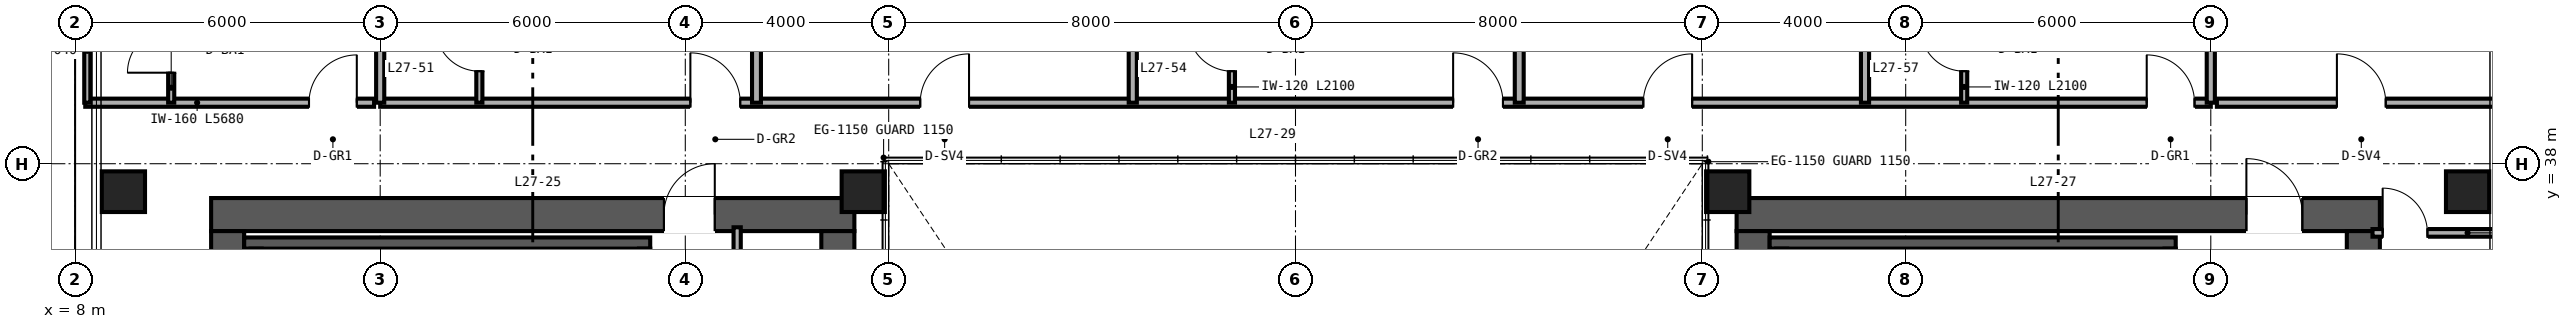
"""IFC4 building model, lengths in metres.
Left out: names, types, materials, properties, quantities, classifications, styles, units other than length and angle.
Written with IfcOpenShell. Run it as: python <this file> out.ifc"""

import sys

from ifc_helpers import new_model, si_unit, direction, frame, frame_2d, origin, origin_2d, place, context, subcontext, project, spatial, rectangle, hollow_rectangle, extrude, source, transform, mapped, element, fill, save


model = new_model("IFC4")
c1 = context("Model", 3, precision=1e-05, world=origin(), true_north=direction((0.0, 1.0)))
c2 = subcontext(c1, "Body", "Model", "MODEL_VIEW")
j1 = project(units=[si_unit("LENGTHUNIT", "METRE"), si_unit("PLANEANGLEUNIT", "RADIAN")], contexts=[c1])
p1 = place(None, origin())
s1 = spatial("IfcSite", under=j1, at=p1, CompositionType="ELEMENT")
p2 = place(p1, origin())
s2 = spatial("IfcBuilding", under=s1, at=p2, CompositionType="ELEMENT")
p3 = place(p2, frame((0.0, 0.0, 111.6)))
s3 = spatial("IfcBuildingStorey", under=s2, at=p3, CompositionType="ELEMENT", Elevation=111.6)
p4 = place(p3, frame((10.675, 37.0, 0.0), z_axis=(0.0, 0.0, 1.0), x_axis=(1.0, 0.0, 0.0)))
e1 = element("IfcWall", 1, at=p4, inside=s3, PredefinedType="SHEAR", context=c2, shape_type="SweptSolid", body=[
    extrude(rectangle(XDim=12.65, YDim=0.65, at=frame_2d((6.325, 0.0))), origin(), (0.0, 0.0, 1.0), 3.36),
])
p5 = place(p4, frame((8.905, 0.0, 0.0)))
e2 = element("IfcOpeningElement", 2, at=p5, cuts=e1, PredefinedType="OPENING", context=c2, shape_type="SweptSolid", body=[
    extrude(rectangle(XDim=1.0, YDim=2.15, at=frame_2d((0.5, 1.075))), frame((0.0, 0.335, 0.0), z_axis=(0.0, -1.0, 0.0), x_axis=(1.0, 0.0, 0.0)), (0.0, 0.0, 1.0), 0.67),
])
for number, where, z_axis, x_axis in (
    (3, (11.0, 15.325, 0.0), (0.0, 0.0, 1.0), (0.0, 1.0, 0.0)),
    (4, (23.0, 15.325, 0.0), (0.0, 0.0, 1.0), (0.0, 1.0, 0.0)),
):
    element("IfcWall", number, at=place(p3, frame(where, z_axis=z_axis, x_axis=x_axis)), inside=s3, PredefinedType="SHEAR", context=c2, shape_type="SweptSolid", body=[
        extrude(rectangle(XDim=21.35, YDim=0.65, at=frame_2d((10.675, 0.0))), origin(), (0.0, 0.0, 1.0), 3.36),
    ])
p6 = place(p3, frame((40.675, 37.0, 0.0), z_axis=(0.0, 0.0, 1.0), x_axis=(1.0, 0.0, 0.0)))
e5 = element("IfcWall", 5, at=p6, inside=s3, PredefinedType="SHEAR", context=c2, shape_type="SweptSolid", body=[
    extrude(rectangle(XDim=12.65, YDim=0.65, at=frame_2d((6.325, 0.0))), origin(), (0.0, 0.0, 1.0), 3.36),
])
p7 = place(p6, frame((10.025, 0.0, 0.0)))
e6 = element("IfcOpeningElement", 6, at=p7, cuts=e5, PredefinedType="OPENING", context=c2, shape_type="SweptSolid", body=[
    extrude(rectangle(XDim=1.1, YDim=2.15, at=frame_2d((0.55, 1.075))), frame((0.0, 0.335, 0.0), z_axis=(0.0, -1.0, 0.0), x_axis=(1.0, 0.0, 0.0)), (0.0, 0.0, 1.0), 0.67),
])
for number, where, z_axis, x_axis in (
    (7, (41.0, 15.325, 0.0), (0.0, 0.0, 1.0), (0.0, 1.0, 0.0)),
    (8, (53.0, 15.325, 0.0), (0.0, 0.0, 1.0), (0.0, 1.0, 0.0)),
):
    element("IfcWall", number, at=place(p3, frame(where, z_axis=z_axis, x_axis=x_axis)), inside=s3, PredefinedType="SHEAR", context=c2, shape_type="SweptSolid", body=[
        extrude(rectangle(XDim=21.35, YDim=0.65, at=frame_2d((10.675, 0.0))), origin(), (0.0, 0.0, 1.0), 3.36),
    ])
p8 = place(p3, frame((11.325, 36.44, 0.0), z_axis=(0.0, 0.0, 1.0), x_axis=(1.0, 0.0, 0.0)))
e9 = element("IfcWall", 9, at=p8, inside=s3, PredefinedType="SHEAR", context=c2, shape_type="SweptSolid", body=[
    extrude(rectangle(XDim=7.985, YDim=0.22, at=frame_2d((3.993, 0.0))), origin(), (0.0, 0.0, 1.0), 3.4),
])
for number, where, z_axis, x_axis in (
    (10, (11.56, 33.05, 0.0), (0.0, 0.0, 1.0), (0.0, 1.0, 0.0)),
    (11, (19.2, 33.05, 0.0), (0.0, 0.0, 1.0), (0.0, 1.0, 0.0)),
):
    element("IfcWall", number, at=place(p3, frame(where, z_axis=z_axis, x_axis=x_axis)), inside=s3, PredefinedType="SHEAR", context=c2, shape_type="SweptSolid", body=[
        extrude(rectangle(XDim=3.28, YDim=0.22, at=frame_2d((1.64, 0.0))), origin(), (0.0, 0.0, 1.0), 3.4),
    ])
p9 = place(p3, frame((41.325, 36.44, 0.0), z_axis=(0.0, 0.0, 1.0), x_axis=(1.0, 0.0, 0.0)))
e12 = element("IfcWall", 12, at=p9, inside=s3, PredefinedType="SHEAR", context=c2, shape_type="SweptSolid", body=[
    extrude(rectangle(XDim=7.985, YDim=0.22, at=frame_2d((3.993, 0.0))), origin(), (0.0, 0.0, 1.0), 3.4),
])
for number, where, z_axis, x_axis in (
    (13, (41.56, 33.05, 0.0), (0.0, 0.0, 1.0), (0.0, 1.0, 0.0)),
    (14, (49.2, 33.05, 0.0), (0.0, 0.0, 1.0), (0.0, 1.0, 0.0)),
):
    element("IfcWall", number, at=place(p3, frame(where, z_axis=z_axis, x_axis=x_axis)), inside=s3, PredefinedType="SHEAR", context=c2, shape_type="SweptSolid", body=[
        extrude(rectangle(XDim=3.28, YDim=0.22, at=frame_2d((1.64, 0.0))), origin(), (0.0, 0.0, 1.0), 3.4),
    ])
m1 = source(origin(), c2, "Body", "SweptSolid", [
    extrude(hollow_rectangle(XDim=0.85, YDim=0.8, WallThickness=0.032, at=origin_2d()), origin(), (0.0, 0.0, 1.0), 3.36),
])
for number, where, z_axis, x_axis in (
    (15, (8.95, 37.45, 0.0), (0.0, 0.0, 1.0), (1.0, 0.0, 0.0)),
    (16, (23.5, 37.45, 0.0), (0.0, 0.0, 1.0), (1.0, 0.0, 0.0)),
    (17, (40.5, 37.45, 0.0), (0.0, 0.0, 1.0), (1.0, 0.0, 0.0)),
    (18, (55.05, 37.45, 0.0), (0.0, 0.0, 1.0), (1.0, 0.0, 0.0)),
):
    element("IfcColumn", number, at=place(p3, frame(where, z_axis=z_axis, x_axis=x_axis)), inside=s3, PredefinedType="COLUMN", context=c2, shape_type="MappedRepresentation", body=[
        mapped(m1, transform((0.0, 0.0, 0.0), scale=1.0)),
    ])
p10 = place(p3, frame((21.02, 33.28, 0.0), z_axis=(0.0, 0.0, 1.0), x_axis=(0.0, 1.0, 0.0)))
e19 = element("IfcWall", 19, at=p10, inside=s3, PredefinedType="PARTITIONING", context=c2, shape_type="SweptSolid", body=[
    extrude(rectangle(XDim=3.47, YDim=0.142, at=frame_2d((1.735, 0.0))), origin(), (0.0, 0.0, 1.0), 3.36),
])
p11 = place(p10, frame((1.15, 0.0, 0.0)))
e20 = element("IfcOpeningElement", 20, at=p11, cuts=e19, PredefinedType="OPENING", context=c2, shape_type="SweptSolid", body=[
    extrude(rectangle(XDim=0.84, YDim=2.1, at=frame_2d((0.42, 1.05))), frame((0.0, 0.081, 0.0), z_axis=(0.0, -1.0, 0.0), x_axis=(1.0, 0.0, 0.0)), (0.0, 0.0, 1.0), 0.162),
])
p12 = place(p3, frame((53.18, 36.64, 0.0), z_axis=(0.0, 0.0, 1.0), x_axis=(1.0, 0.0, 0.0)))
e21 = element("IfcWall", 21, at=p12, inside=s3, PredefinedType="PARTITIONING", context=c2, shape_type="SweptSolid", body=[
    extrude(rectangle(XDim=2.66, YDim=0.15, at=frame_2d((1.33, 0.0))), origin(), (0.0, 0.0, 1.0), 2.743),
])
p13 = place(p12, frame((0.2, 0.0, 0.0)))
e22 = element("IfcOpeningElement", 22, at=p13, cuts=e21, PredefinedType="OPENING", context=c2, shape_type="SweptSolid", body=[
    extrude(rectangle(XDim=0.88, YDim=2.15, at=frame_2d((0.44, 1.075))), frame((0.0, 0.085, 0.0), z_axis=(0.0, -1.0, 0.0), x_axis=(1.0, 0.0, 0.0)), (0.0, 0.0, 1.0), 0.17),
])
p14 = place(p3, frame((8.2, 39.2, 0.0), z_axis=(0.0, 0.0, 1.0), x_axis=(1.0, 0.0, 0.0)))
e23 = element("IfcWall", 23, at=p14, inside=s3, PredefinedType="PARTITIONING", context=c2, shape_type="SweptSolid", body=[
    extrude(rectangle(XDim=5.68, YDim=0.16, at=frame_2d((2.84, 0.0))), origin(), (0.0, 0.0, 1.0), 3.36),
])
p15 = place(p14, frame((4.4, 0.0, 0.0)))
e24 = element("IfcOpeningElement", 24, at=p15, cuts=e23, PredefinedType="OPENING", context=c2, shape_type="SweptSolid", body=[
    extrude(rectangle(XDim=0.94, YDim=2.15, at=frame_2d((0.47, 1.075))), frame((0.0, 0.09, 0.0), z_axis=(0.0, -1.0, 0.0), x_axis=(1.0, 0.0, 0.0)), (0.0, 0.0, 1.0), 0.18),
])
p16 = place(p3, frame((9.89, 39.2, 0.0), z_axis=(0.0, 0.0, 1.0), x_axis=(0.0, 1.0, 0.0)))
e25 = element("IfcWall", 25, at=p16, inside=s3, PredefinedType="PARTITIONING", context=c2, shape_type="SweptSolid", body=[
    extrude(rectangle(XDim=2.04, YDim=0.12, at=frame_2d((1.02, 0.0))), origin(), (0.0, 0.0, 1.0), 3.36),
])
p17 = place(p16, frame((0.59, 0.0, 0.0)))
e26 = element("IfcOpeningElement", 26, at=p17, cuts=e25, PredefinedType="OPENING", context=c2, shape_type="SweptSolid", body=[
    extrude(rectangle(XDim=0.86, YDim=2.1, at=frame_2d((0.43, 1.05))), frame((0.0, 0.07, 0.0), z_axis=(0.0, -1.0, 0.0), x_axis=(1.0, 0.0, 0.0)), (0.0, 0.0, 1.0), 0.14),
])
p18 = place(p3, frame((8.24, 39.2, 0.0), z_axis=(0.0, 0.0, 1.0), x_axis=(0.0, 1.0, 0.0)))
e27 = element("IfcWall", 27, at=p18, inside=s3, PredefinedType="PARTITIONING", context=c2, shape_type="SweptSolid", body=[
    extrude(rectangle(XDim=2.04, YDim=0.12, at=frame_2d((1.02, 0.0))), origin(), (0.0, 0.0, 1.0), 3.36),
])
p19 = place(p3, frame((50.12, 39.2, 0.0), z_axis=(0.0, 0.0, 1.0), x_axis=(1.0, 0.0, 0.0)))
e28 = element("IfcWall", 28, at=p19, inside=s3, PredefinedType="PARTITIONING", context=c2, shape_type="SweptSolid", body=[
    extrude(rectangle(XDim=5.68, YDim=0.16, at=frame_2d((2.84, 0.0))), origin(), (0.0, 0.0, 1.0), 3.36),
])
p20 = place(p19, frame((2.36, 0.0, 0.0)))
e29 = element("IfcOpeningElement", 29, at=p20, cuts=e28, PredefinedType="OPENING", context=c2, shape_type="SweptSolid", body=[
    extrude(rectangle(XDim=0.96, YDim=2.15, at=frame_2d((0.48, 1.075))), frame((0.0, 0.09, 0.0), z_axis=(0.0, -1.0, 0.0), x_axis=(1.0, 0.0, 0.0)), (0.0, 0.0, 1.0), 0.18),
])
p21 = place(p3, frame((14.0, 39.2, 0.0), z_axis=(0.0, 0.0, 1.0), x_axis=(1.0, 0.0, 0.0)))
e30 = element("IfcWall", 30, at=p21, inside=s3, PredefinedType="PARTITIONING", context=c2, shape_type="SweptSolid", body=[
    extrude(rectangle(XDim=36.0, YDim=0.16, at=frame_2d((18.0, 0.0))), origin(), (0.0, 0.0, 1.0), 2.581),
])
p22 = place(p21, frame((6.1, 0.0, 0.0)))
e31 = element("IfcOpeningElement", 31, at=p22, cuts=e30, PredefinedType="OPENING", context=c2, shape_type="SweptSolid", body=[
    extrude(rectangle(XDim=0.98, YDim=2.2, at=frame_2d((0.49, 1.1))), frame((0.0, 0.09, 0.0), z_axis=(0.0, -1.0, 0.0), x_axis=(1.0, 0.0, 0.0)), (0.0, 0.0, 1.0), 0.18),
])
p23 = place(p21, frame((10.62, 0.0, 0.0)))
e32 = element("IfcOpeningElement", 32, at=p23, cuts=e30, PredefinedType="OPENING", context=c2, shape_type="SweptSolid", body=[
    extrude(rectangle(XDim=0.96, YDim=2.15, at=frame_2d((0.48, 1.075))), frame((0.0, 0.09, 0.0), z_axis=(0.0, -1.0, 0.0), x_axis=(1.0, 0.0, 0.0)), (0.0, 0.0, 1.0), 0.18),
])
p24 = place(p21, frame((21.1, 0.0, 0.0)))
e33 = element("IfcOpeningElement", 33, at=p24, cuts=e30, PredefinedType="OPENING", context=c2, shape_type="SweptSolid", body=[
    extrude(rectangle(XDim=0.98, YDim=2.2, at=frame_2d((0.49, 1.1))), frame((0.0, 0.09, 0.0), z_axis=(0.0, -1.0, 0.0), x_axis=(1.0, 0.0, 0.0)), (0.0, 0.0, 1.0), 0.18),
])
p25 = place(p21, frame((24.84, 0.0, 0.0)))
e34 = element("IfcOpeningElement", 34, at=p25, cuts=e30, PredefinedType="OPENING", context=c2, shape_type="SweptSolid", body=[
    extrude(rectangle(XDim=0.96, YDim=2.15, at=frame_2d((0.48, 1.075))), frame((0.0, 0.09, 0.0), z_axis=(0.0, -1.0, 0.0), x_axis=(1.0, 0.0, 0.0)), (0.0, 0.0, 1.0), 0.18),
])
p26 = place(p21, frame((34.74, 0.0, 0.0)))
e35 = element("IfcOpeningElement", 35, at=p26, cuts=e30, PredefinedType="OPENING", context=c2, shape_type="SweptSolid", body=[
    extrude(rectangle(XDim=0.94, YDim=2.15, at=frame_2d((0.47, 1.075))), frame((0.0, 0.09, 0.0), z_axis=(0.0, -1.0, 0.0), x_axis=(1.0, 0.0, 0.0)), (0.0, 0.0, 1.0), 0.18),
])
for number, where, z_axis, x_axis in (
    (36, (14.0, 39.2, 0.0), (0.0, 0.0, 1.0), (0.0, 1.0, 0.0)),
    (37, (50.0, 39.2, 0.0), (0.0, 0.0, 1.0), (0.0, 1.0, 0.0)),
):
    element("IfcWall", number, at=place(p3, frame(where, z_axis=z_axis, x_axis=x_axis)), inside=s3, PredefinedType="PARTITIONING", context=c2, shape_type="SweptSolid", body=[
        extrude(rectangle(XDim=10.44, YDim=0.16, at=frame_2d((5.22, 0.0))), origin(), (0.0, 0.0, 1.0), 2.667),
    ])
p27 = place(p3, frame((21.4, 39.2, 0.0), z_axis=(0.0, 0.0, 1.0), x_axis=(0.0, 1.0, 0.0)))
e38 = element("IfcWall", 38, at=p27, inside=s3, PredefinedType="PARTITIONING", context=c2, shape_type="SweptSolid", body=[
    extrude(rectangle(XDim=10.44, YDim=0.175, at=frame_2d((5.22, 0.0))), origin(), (0.0, 0.0, 1.0), 2.823),
])
p28 = place(p3, frame((15.95, 39.2, 0.0), z_axis=(0.0, 0.0, 1.0), x_axis=(0.0, 1.0, 0.0)))
e39 = element("IfcWall", 39, at=p28, inside=s3, PredefinedType="PARTITIONING", context=c2, shape_type="SweptSolid", body=[
    extrude(rectangle(XDim=2.1, YDim=0.12, at=frame_2d((1.05, 0.0))), origin(), (0.0, 0.0, 1.0), 3.36),
])
p29 = place(p28, frame((0.62, 0.0, 0.0)))
e40 = element("IfcOpeningElement", 40, at=p29, cuts=e39, PredefinedType="OPENING", context=c2, shape_type="SweptSolid", body=[
    extrude(rectangle(XDim=0.86, YDim=2.1, at=frame_2d((0.43, 1.05))), frame((0.0, 0.07, 0.0), z_axis=(0.0, -1.0, 0.0), x_axis=(1.0, 0.0, 0.0)), (0.0, 0.0, 1.0), 0.14),
])
p30 = place(p3, frame((28.8, 39.2, 0.0), z_axis=(0.0, 0.0, 1.0), x_axis=(0.0, 1.0, 0.0)))
e41 = element("IfcWall", 41, at=p30, inside=s3, PredefinedType="PARTITIONING", context=c2, shape_type="SweptSolid", body=[
    extrude(rectangle(XDim=10.44, YDim=0.16, at=frame_2d((5.22, 0.0))), origin(), (0.0, 0.0, 1.0), 2.433),
])
p31 = place(p3, frame((36.4, 39.2, 0.0), z_axis=(0.0, 0.0, 1.0), x_axis=(0.0, 1.0, 0.0)))
e42 = element("IfcWall", 42, at=p31, inside=s3, PredefinedType="PARTITIONING", context=c2, shape_type="SweptSolid", body=[
    extrude(rectangle(XDim=10.44, YDim=0.175, at=frame_2d((5.22, 0.0))), origin(), (0.0, 0.0, 1.0), 2.433),
])
p32 = place(p3, frame((30.75, 39.2, 0.0), z_axis=(0.0, 0.0, 1.0), x_axis=(0.0, 1.0, 0.0)))
e43 = element("IfcWall", 43, at=p32, inside=s3, PredefinedType="PARTITIONING", context=c2, shape_type="SweptSolid", body=[
    extrude(rectangle(XDim=2.1, YDim=0.12, at=frame_2d((1.05, 0.0))), origin(), (0.0, 0.0, 1.0), 3.36),
])
p33 = place(p32, frame((0.62, 0.0, 0.0)))
e44 = element("IfcOpeningElement", 44, at=p33, cuts=e43, PredefinedType="OPENING", context=c2, shape_type="SweptSolid", body=[
    extrude(rectangle(XDim=0.86, YDim=2.1, at=frame_2d((0.43, 1.05))), frame((0.0, 0.07, 0.0), z_axis=(0.0, -1.0, 0.0), x_axis=(1.0, 0.0, 0.0)), (0.0, 0.0, 1.0), 0.14),
])
p34 = place(p3, frame((43.2, 39.2, 0.0), z_axis=(0.0, 0.0, 1.0), x_axis=(0.0, 1.0, 0.0)))
e45 = element("IfcWall", 45, at=p34, inside=s3, PredefinedType="PARTITIONING", context=c2, shape_type="SweptSolid", body=[
    extrude(rectangle(XDim=10.44, YDim=0.16, at=frame_2d((5.22, 0.0))), origin(), (0.0, 0.0, 1.0), 2.823),
])
p35 = place(p3, frame((45.15, 39.2, 0.0), z_axis=(0.0, 0.0, 1.0), x_axis=(0.0, 1.0, 0.0)))
e46 = element("IfcWall", 46, at=p35, inside=s3, PredefinedType="PARTITIONING", context=c2, shape_type="SweptSolid", body=[
    extrude(rectangle(XDim=2.1, YDim=0.12, at=frame_2d((1.05, 0.0))), origin(), (0.0, 0.0, 1.0), 3.36),
])
p36 = place(p35, frame((0.62, 0.0, 0.0)))
e47 = element("IfcOpeningElement", 47, at=p36, cuts=e46, PredefinedType="OPENING", context=c2, shape_type="SweptSolid", body=[
    extrude(rectangle(XDim=0.86, YDim=2.1, at=frame_2d((0.43, 1.05))), frame((0.0, 0.07, 0.0), z_axis=(0.0, -1.0, 0.0), x_axis=(1.0, 0.0, 0.0)), (0.0, 0.0, 1.0), 0.14),
])
m2 = source(origin(), c2, "Body", "SweptSolid", [
    extrude(rectangle(XDim=1.0, YDim=2.15, at=frame_2d((0.5, 1.075))), frame((0.0, 0.025, 0.0), z_axis=(0.0, -1.0, 0.0), x_axis=(1.0, 0.0, 0.0)), (0.0, 0.0, 1.0), 0.05),
])
p37 = place(p5, origin())
e48 = element("IfcDoor", 48, at=p37, inside=s3, OperationType="SINGLE_SWING_RIGHT", PredefinedType="DOOR", context=c2, shape_type="MappedRepresentation", body=[
    mapped(m2, transform((0.0, 0.0, 0.0), scale=1.0)),
])
fill(e2, e48)
m3 = source(origin(), c2, "Body", "SweptSolid", [
    extrude(rectangle(XDim=1.1, YDim=2.15, at=frame_2d((0.55, 1.075))), frame((0.0, 0.025, 0.0), z_axis=(0.0, -1.0, 0.0), x_axis=(1.0, 0.0, 0.0)), (0.0, 0.0, 1.0), 0.05),
])
p38 = place(p7, origin())
e49 = element("IfcDoor", 49, at=p38, inside=s3, OperationType="SINGLE_SWING_LEFT", PredefinedType="DOOR", context=c2, shape_type="MappedRepresentation", body=[
    mapped(m3, transform((0.0, 0.0, 0.0), scale=1.0)),
])
fill(e6, e49)
m4 = source(origin(), c2, "Body", "SweptSolid", [
    extrude(rectangle(XDim=0.88, YDim=2.15, at=frame_2d((0.44, 1.075))), frame((0.0, 0.025, 0.0), z_axis=(0.0, -1.0, 0.0), x_axis=(1.0, 0.0, 0.0)), (0.0, 0.0, 1.0), 0.05),
])
p39 = place(p13, origin())
e50 = element("IfcDoor", 50, at=p39, inside=s3, OperationType="SINGLE_SWING_LEFT", PredefinedType="DOOR", context=c2, shape_type="MappedRepresentation", body=[
    mapped(m4, transform((0.0, 0.0, 0.0), scale=1.0)),
])
fill(e22, e50)
m5 = source(origin(), c2, "Body", "SweptSolid", [
    extrude(rectangle(XDim=0.86, YDim=2.1, at=frame_2d((0.43, 1.05))), frame((0.0, 0.025, 0.0), z_axis=(0.0, -1.0, 0.0), x_axis=(1.0, 0.0, 0.0)), (0.0, 0.0, 1.0), 0.05),
])
p40 = place(p17, origin())
e51 = element("IfcDoor", 51, at=p40, inside=s3, OperationType="SINGLE_SWING_LEFT", PredefinedType="DOOR", context=c2, shape_type="MappedRepresentation", body=[
    mapped(m5, transform((0.0, 0.0, 0.0), scale=1.0)),
])
fill(e26, e51)
m6 = source(origin(), c2, "Body", "SweptSolid", [
    extrude(rectangle(XDim=0.94, YDim=2.15, at=frame_2d((0.47, 1.075))), frame((0.0, 0.025, 0.0), z_axis=(0.0, -1.0, 0.0), x_axis=(1.0, 0.0, 0.0)), (0.0, 0.0, 1.0), 0.05),
])
p41 = place(p15, origin())
e52 = element("IfcDoor", 52, at=p41, inside=s3, OperationType="SINGLE_SWING_RIGHT", PredefinedType="DOOR", context=c2, shape_type="MappedRepresentation", body=[
    mapped(m6, transform((0.0, 0.0, 0.0), scale=1.0)),
])
fill(e24, e52)
m7 = source(origin(), c2, "Body", "SweptSolid", [
    extrude(rectangle(XDim=0.96, YDim=2.15, at=frame_2d((0.48, 1.075))), frame((0.0, 0.025, 0.0), z_axis=(0.0, -1.0, 0.0), x_axis=(1.0, 0.0, 0.0)), (0.0, 0.0, 1.0), 0.05),
])
p42 = place(p20, origin())
e53 = element("IfcDoor", 53, at=p42, inside=s3, OperationType="SINGLE_SWING_LEFT", PredefinedType="DOOR", context=c2, shape_type="MappedRepresentation", body=[
    mapped(m7, transform((0.0, 0.0, 0.0), scale=1.0)),
])
fill(e29, e53)
p43 = place(p29, origin())
e54 = element("IfcDoor", 54, at=p43, inside=s3, OperationType="SINGLE_SWING_RIGHT", PredefinedType="DOOR", context=c2, shape_type="MappedRepresentation", body=[
    mapped(m5, transform((0.0, 0.0, 0.0), scale=1.0)),
])
fill(e40, e54)
p44 = place(p33, origin())
e55 = element("IfcDoor", 55, at=p44, inside=s3, OperationType="SINGLE_SWING_RIGHT", PredefinedType="DOOR", context=c2, shape_type="MappedRepresentation", body=[
    mapped(m5, transform((0.0, 0.0, 0.0), scale=1.0)),
])
fill(e44, e55)
p45 = place(p36, origin())
e56 = element("IfcDoor", 56, at=p45, inside=s3, OperationType="SINGLE_SWING_RIGHT", PredefinedType="DOOR", context=c2, shape_type="MappedRepresentation", body=[
    mapped(m5, transform((0.0, 0.0, 0.0), scale=1.0)),
])
fill(e47, e56)
m8 = source(origin(), c2, "Body", "SweptSolid", [
    extrude(rectangle(XDim=0.98, YDim=2.2, at=frame_2d((0.49, 1.1))), frame((0.0, 0.025, 0.0), z_axis=(0.0, -1.0, 0.0), x_axis=(1.0, 0.0, 0.0)), (0.0, 0.0, 1.0), 0.05),
])
p46 = place(p22, origin())
e57 = element("IfcDoor", 57, at=p46, inside=s3, OperationType="SINGLE_SWING_LEFT", PredefinedType="DOOR", context=c2, shape_type="MappedRepresentation", body=[
    mapped(m8, transform((0.0, 0.0, 0.0), scale=1.0)),
])
fill(e31, e57)
p47 = place(p23, origin())
e58 = element("IfcDoor", 58, at=p47, inside=s3, OperationType="SINGLE_SWING_RIGHT", PredefinedType="DOOR", context=c2, shape_type="MappedRepresentation", body=[
    mapped(m7, transform((0.0, 0.0, 0.0), scale=1.0)),
])
fill(e32, e58)
p48 = place(p24, origin())
e59 = element("IfcDoor", 59, at=p48, inside=s3, OperationType="SINGLE_SWING_LEFT", PredefinedType="DOOR", context=c2, shape_type="MappedRepresentation", body=[
    mapped(m8, transform((0.0, 0.0, 0.0), scale=1.0)),
])
fill(e33, e59)
p49 = place(p25, origin())
e60 = element("IfcDoor", 60, at=p49, inside=s3, OperationType="SINGLE_SWING_RIGHT", PredefinedType="DOOR", context=c2, shape_type="MappedRepresentation", body=[
    mapped(m7, transform((0.0, 0.0, 0.0), scale=1.0)),
])
fill(e34, e60)
p50 = place(p26, origin())
e61 = element("IfcDoor", 61, at=p50, inside=s3, OperationType="SINGLE_SWING_LEFT", PredefinedType="DOOR", context=c2, shape_type="MappedRepresentation", body=[
    mapped(m6, transform((0.0, 0.0, 0.0), scale=1.0)),
])
fill(e35, e61)
save(model, sys.argv[1])
